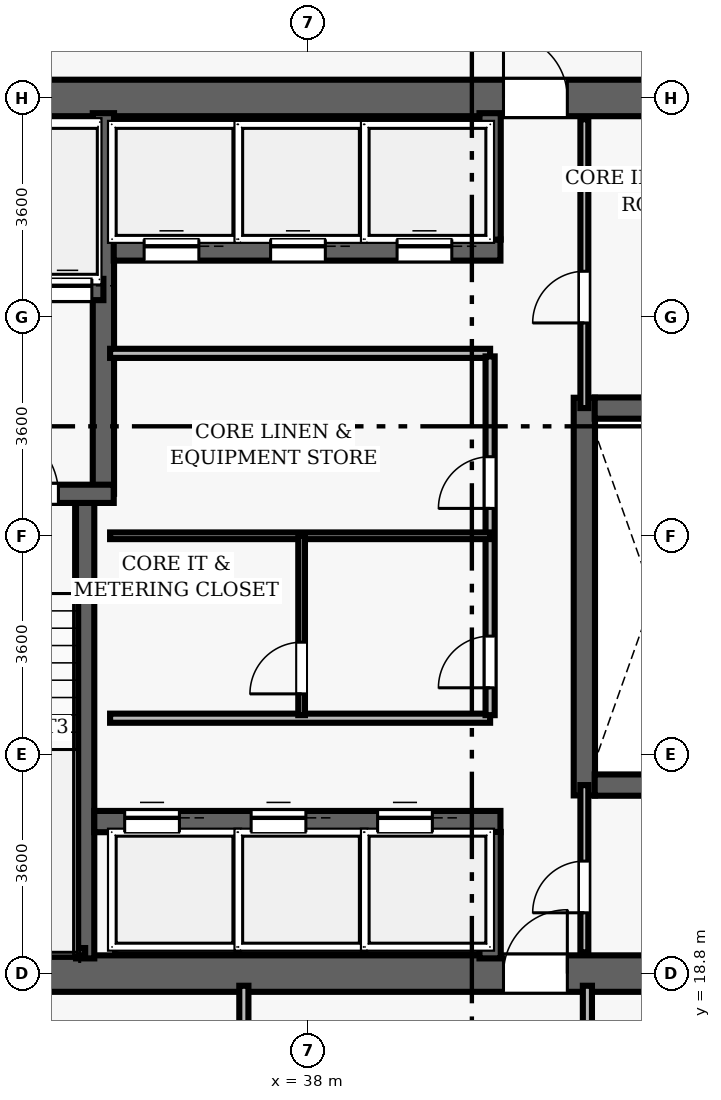
"""IFC4 building model, lengths in metres.
Left out: names, types, materials, properties, quantities, classifications, styles, units other than length and angle.
Written with IfcOpenShell. Run it as: python <this file> out.ifc"""

import sys

from ifc_helpers import new_model, si_unit, direction, frame, frame_2d, origin, place, context, subcontext, project, spatial, rectangle, extrude, element, fill, save


model = new_model("IFC4")
c1 = context("Model", 3, precision=1e-05, world=origin(), true_north=direction((0.0, 1.0)))
c2 = subcontext(c1, "Body", "Model", "MODEL_VIEW")
j1 = project(units=[si_unit("LENGTHUNIT", "METRE"), si_unit("PLANEANGLEUNIT", "RADIAN")], contexts=[c1])
p1 = place(None, origin())
s1 = spatial("IfcSite", under=j1, at=p1, CompositionType="ELEMENT")
p2 = place(p1, origin())
s2 = spatial("IfcBuilding", under=s1, at=p2, CompositionType="ELEMENT")
p3 = place(p2, frame((0.0, 0.0, 102.8)))
s3 = spatial("IfcBuildingStorey", under=s2, at=p3, CompositionType="ELEMENT", Elevation=102.8)
p4 = place(p3, frame((26.7, 18.8, 0.0), z_axis=(0.0, 0.0, 1.0), x_axis=(1.0, 0.0, 0.0)))
e1 = element("IfcWall", 1, at=p4, inside=s3, PredefinedType="SHEAR", context=c2, shape_type="SweptSolid", body=[
    extrude(rectangle(XDim=22.6, YDim=0.6, at=frame_2d((11.3, 0.0))), origin(), (0.0, 0.0, 1.0), 3.5),
])
p5 = place(p4, frame((14.52, 0.0, 0.0)))
e2 = element("IfcOpeningElement", 2, at=p5, cuts=e1, PredefinedType="OPENING", context=c2, shape_type="SweptSolid", body=[
    extrude(rectangle(XDim=1.05, YDim=2.15, at=frame_2d((0.525, 1.075))), frame((0.0, 0.31, 0.0), z_axis=(0.0, -1.0, 0.0), x_axis=(1.0, 0.0, 0.0)), (0.0, 0.0, 1.0), 0.62),
])
p6 = place(p3, frame((26.7, 33.2, 0.0), z_axis=(0.0, 0.0, 1.0), x_axis=(1.0, 0.0, 0.0)))
e3 = element("IfcWall", 3, at=p6, inside=s3, PredefinedType="SHEAR", context=c2, shape_type="SweptSolid", body=[
    extrude(rectangle(XDim=22.6, YDim=0.6, at=frame_2d((11.3, 0.0))), origin(), (0.0, 0.0, 1.0), 3.5),
])
p7 = place(p6, frame((4.62, 0.0, 0.0)))
e4 = element("IfcOpeningElement", 4, at=p7, cuts=e3, PredefinedType="OPENING", context=c2, shape_type="SweptSolid", body=[
    extrude(rectangle(XDim=1.05, YDim=2.15, at=frame_2d((0.525, 1.075))), frame((0.0, 0.31, 0.0), z_axis=(0.0, -1.0, 0.0), x_axis=(1.0, 0.0, 0.0)), (0.0, 0.0, 1.0), 0.62),
])
p8 = place(p6, frame((14.52, 0.0, 0.0)))
e5 = element("IfcOpeningElement", 5, at=p8, cuts=e3, PredefinedType="OPENING", context=c2, shape_type="SweptSolid", body=[
    extrude(rectangle(XDim=1.05, YDim=2.15, at=frame_2d((0.525, 1.075))), frame((0.0, 0.31, 0.0), z_axis=(0.0, -1.0, 0.0), x_axis=(1.0, 0.0, 0.0)), (0.0, 0.0, 1.0), 0.62),
])
p9 = place(p3, frame((34.34, 19.05, 0.0), z_axis=(0.0, 0.0, 1.0), x_axis=(0.0, 1.0, 0.0)))
e6 = element("IfcWall", 6, at=p9, inside=s3, PredefinedType="SHEAR", context=c2, shape_type="SweptSolid", body=[
    extrude(rectangle(XDim=7.5, YDim=0.3, at=frame_2d((3.75, 0.0))), origin(), (0.0, 0.0, 1.0), 3.5),
])
p10 = place(p3, frame((34.64, 26.69, 0.0), z_axis=(0.0, 0.0, 1.0), x_axis=(0.0, 1.0, 0.0)))
e7 = element("IfcWall", 7, at=p10, inside=s3, PredefinedType="SHEAR", context=c2, shape_type="SweptSolid", body=[
    extrude(rectangle(XDim=6.26, YDim=0.35, at=frame_2d((3.13, 0.0))), origin(), (0.0, 0.0, 1.0), 3.5),
])
p11 = place(p3, frame((31.25, 26.69, 0.0), z_axis=(0.0, 0.0, 1.0), x_axis=(1.0, 0.0, 0.0)))
e8 = element("IfcWall", 8, at=p11, inside=s3, PredefinedType="SHEAR", context=c2, shape_type="SweptSolid", body=[
    extrude(rectangle(XDim=3.56, YDim=0.3, at=frame_2d((1.78, 0.0))), origin(), (0.0, 0.0, 1.0), 3.5),
])
p12 = place(p11, frame((1.55, 0.0, 0.0)))
e9 = element("IfcOpeningElement", 9, at=p12, cuts=e8, PredefinedType="OPENING", context=c2, shape_type="SweptSolid", body=[
    extrude(rectangle(XDim=1.1, YDim=2.15, at=frame_2d((0.55, 1.075))), frame((0.0, 0.16, 0.0), z_axis=(0.0, -1.0, 0.0), x_axis=(1.0, 0.0, 0.0)), (0.0, 0.0, 1.0), 0.32),
])
p13 = place(p3, frame((31.3, 19.16, 0.0), z_axis=(0.0, 0.0, 1.0), x_axis=(1.0, 0.0, 0.0)))
e10 = element("IfcWall", 10, at=p13, inside=s3, PredefinedType="SHEAR", context=c2, shape_type="SweptSolid", body=[
    extrude(rectangle(XDim=3.04, YDim=0.12, at=frame_2d((1.52, 0.0))), origin(), (0.0, 0.0, 1.0), 3.5),
])
p14 = place(p3, frame((32.23, 30.05, 0.0), z_axis=(0.0, 0.0, 1.0), x_axis=(1.0, 0.0, 0.0)))
e11 = element("IfcWall", 11, at=p14, inside=s3, PredefinedType="SHEAR", context=c2, shape_type="SweptSolid", body=[
    extrude(rectangle(XDim=2.41, YDim=0.35, at=frame_2d((1.205, 0.0))), origin(), (0.0, 0.0, 1.0), 2.675),
])
p15 = place(p14, frame((0.42, 0.0, 0.0)))
e12 = element("IfcOpeningElement", 12, at=p15, cuts=e11, PredefinedType="OPENING", context=c2, shape_type="SweptSolid", body=[
    extrude(rectangle(XDim=0.8, YDim=2.15, at=frame_2d((0.4, 1.075))), frame((0.0, 0.185, 0.0), z_axis=(0.0, -1.0, 0.0), x_axis=(1.0, 0.0, 0.0)), (0.0, 0.0, 1.0), 0.37),
])
p16 = place(p14, frame((1.42, 0.0, 0.0)))
e13 = element("IfcOpeningElement", 13, at=p16, cuts=e11, PredefinedType="OPENING", context=c2, shape_type="SweptSolid", body=[
    extrude(rectangle(XDim=0.8, YDim=2.15, at=frame_2d((0.4, 1.075))), frame((0.0, 0.185, 0.0), z_axis=(0.0, -1.0, 0.0), x_axis=(1.0, 0.0, 0.0)), (0.0, 0.0, 1.0), 0.37),
])
p17 = place(p3, frame((42.55, 21.73, 0.0), z_axis=(0.0, 0.0, 1.0), x_axis=(0.0, 1.0, 0.0)))
e14 = element("IfcWall", 14, at=p17, inside=s3, PredefinedType="SHEAR", context=c2, shape_type="SweptSolid", body=[
    extrude(rectangle(XDim=6.54, YDim=0.35, at=frame_2d((3.27, 0.0))), origin(), (0.0, 0.0, 1.0), 2.675),
])
for number, where, z_axis, x_axis in (
    (15, (42.72, 21.9, 0.0), (0.0, 0.0, 1.0), (1.0, 0.0, 0.0)),
    (16, (42.72, 28.1, 0.0), (0.0, 0.0, 1.0), (1.0, 0.0, 0.0)),
):
    element("IfcWall", number, at=place(p3, frame(where, z_axis=z_axis, x_axis=x_axis)), inside=s3, PredefinedType="SHEAR", context=c2, shape_type="SweptSolid", body=[
        extrude(rectangle(XDim=2.03, YDim=0.35, at=frame_2d((1.015, 0.0))), origin(), (0.0, 0.0, 1.0), 2.675),
    ])
p18 = place(p3, frame((34.81, 30.7, 0.0), z_axis=(0.0, 0.0, 1.0), x_axis=(1.0, 0.0, 0.0)))
e17 = element("IfcWall", 17, at=p18, inside=s3, PredefinedType="SHEAR", context=c2, shape_type="SweptSolid", body=[
    extrude(rectangle(XDim=6.36, YDim=0.35, at=frame_2d((3.18, 0.0))), origin(), (0.0, 0.0, 1.0), 2.675),
])
p19 = place(p18, frame((0.5, 0.0, 0.0)))
e18 = element("IfcOpeningElement", 18, at=p19, cuts=e17, PredefinedType="OPENING", context=c2, shape_type="SweptSolid", body=[
    extrude(rectangle(XDim=0.9, YDim=2.15, at=frame_2d((0.45, 1.075))), frame((0.0, 0.185, 0.0), z_axis=(0.0, -1.0, 0.0), x_axis=(1.0, 0.0, 0.0)), (0.0, 0.0, 1.0), 0.37),
])
p20 = place(p18, frame((2.58, 0.0, 0.0)))
e19 = element("IfcOpeningElement", 19, at=p20, cuts=e17, PredefinedType="OPENING", context=c2, shape_type="SweptSolid", body=[
    extrude(rectangle(XDim=0.9, YDim=2.15, at=frame_2d((0.45, 1.075))), frame((0.0, 0.185, 0.0), z_axis=(0.0, -1.0, 0.0), x_axis=(1.0, 0.0, 0.0)), (0.0, 0.0, 1.0), 0.37),
])
p21 = place(p18, frame((4.66, 0.0, 0.0)))
e20 = element("IfcOpeningElement", 20, at=p21, cuts=e17, PredefinedType="OPENING", context=c2, shape_type="SweptSolid", body=[
    extrude(rectangle(XDim=0.9, YDim=2.15, at=frame_2d((0.45, 1.075))), frame((0.0, 0.185, 0.0), z_axis=(0.0, -1.0, 0.0), x_axis=(1.0, 0.0, 0.0)), (0.0, 0.0, 1.0), 0.37),
])
p22 = place(p3, frame((41.0, 30.87, 0.0), z_axis=(0.0, 0.0, 1.0), x_axis=(0.0, 1.0, 0.0)))
e21 = element("IfcWall", 21, at=p22, inside=s3, PredefinedType="SHEAR", context=c2, shape_type="SweptSolid", body=[
    extrude(rectangle(XDim=2.08, YDim=0.35, at=frame_2d((1.04, 0.0))), origin(), (0.0, 0.0, 1.0), 2.675),
])
p23 = place(p3, frame((34.49, 21.3, 0.0), z_axis=(0.0, 0.0, 1.0), x_axis=(1.0, 0.0, 0.0)))
e22 = element("IfcWall", 22, at=p23, inside=s3, PredefinedType="SHEAR", context=c2, shape_type="SweptSolid", body=[
    extrude(rectangle(XDim=6.68, YDim=0.35, at=frame_2d((3.34, 0.0))), origin(), (0.0, 0.0, 1.0), 2.675),
])
p24 = place(p23, frame((0.5, 0.0, 0.0)))
e23 = element("IfcOpeningElement", 23, at=p24, cuts=e22, PredefinedType="OPENING", context=c2, shape_type="SweptSolid", body=[
    extrude(rectangle(XDim=0.9, YDim=2.15, at=frame_2d((0.45, 1.075))), frame((0.0, 0.185, 0.0), z_axis=(0.0, -1.0, 0.0), x_axis=(1.0, 0.0, 0.0)), (0.0, 0.0, 1.0), 0.37),
])
p25 = place(p23, frame((2.58, 0.0, 0.0)))
e24 = element("IfcOpeningElement", 24, at=p25, cuts=e22, PredefinedType="OPENING", context=c2, shape_type="SweptSolid", body=[
    extrude(rectangle(XDim=0.9, YDim=2.15, at=frame_2d((0.45, 1.075))), frame((0.0, 0.185, 0.0), z_axis=(0.0, -1.0, 0.0), x_axis=(1.0, 0.0, 0.0)), (0.0, 0.0, 1.0), 0.37),
])
p26 = place(p23, frame((4.66, 0.0, 0.0)))
e25 = element("IfcOpeningElement", 25, at=p26, cuts=e22, PredefinedType="OPENING", context=c2, shape_type="SweptSolid", body=[
    extrude(rectangle(XDim=0.9, YDim=2.15, at=frame_2d((0.45, 1.075))), frame((0.0, 0.185, 0.0), z_axis=(0.0, -1.0, 0.0), x_axis=(1.0, 0.0, 0.0)), (0.0, 0.0, 1.0), 0.37),
])
p27 = place(p3, frame((41.0, 19.05, 0.0), z_axis=(0.0, 0.0, 1.0), x_axis=(0.0, 1.0, 0.0)))
e26 = element("IfcWall", 26, at=p27, inside=s3, PredefinedType="SHEAR", context=c2, shape_type="SweptSolid", body=[
    extrude(rectangle(XDim=2.08, YDim=0.35, at=frame_2d((1.04, 0.0))), origin(), (0.0, 0.0, 1.0), 2.675),
])
for number, where, z_axis, x_axis in (
    (27, (34.75, 29.0, 0.0), (0.0, 0.0, 1.0), (1.0, 0.0, 0.0)),
    (28, (34.75, 23.0, 0.0), (0.0, 0.0, 1.0), (1.0, 0.0, 0.0)),
):
    element("IfcWall", number, at=place(p3, frame(where, z_axis=z_axis, x_axis=x_axis)), inside=s3, PredefinedType="PARTITIONING", context=c2, shape_type="SweptSolid", body=[
        extrude(rectangle(XDim=6.25, YDim=0.15, at=frame_2d((3.125, 0.0))), origin(), (0.0, 0.0, 1.0), 2.675),
    ])
p28 = place(p3, frame((41.0, 23.05, 0.0), z_axis=(0.0, 0.0, 1.0), x_axis=(0.0, 1.0, 0.0)))
e29 = element("IfcWall", 29, at=p28, inside=s3, PredefinedType="PARTITIONING", context=c2, shape_type="SweptSolid", body=[
    extrude(rectangle(XDim=5.9, YDim=0.15, at=frame_2d((2.95, 0.0))), origin(), (0.0, 0.0, 1.0), 2.675),
])
p29 = place(p28, frame((3.4, 0.0, 0.0)))
e30 = element("IfcOpeningElement", 30, at=p29, cuts=e29, PredefinedType="OPENING", context=c2, shape_type="SweptSolid", body=[
    extrude(rectangle(XDim=0.85, YDim=2.1, at=frame_2d((0.425, 1.05))), frame((0.0, 0.085, 0.0), z_axis=(0.0, -1.0, 0.0), x_axis=(1.0, 0.0, 0.0)), (0.0, 0.0, 1.0), 0.17),
])
p30 = place(p28, frame((0.45, 0.0, 0.0)))
e31 = element("IfcOpeningElement", 31, at=p30, cuts=e29, PredefinedType="OPENING", context=c2, shape_type="SweptSolid", body=[
    extrude(rectangle(XDim=0.85, YDim=2.1, at=frame_2d((0.425, 1.05))), frame((0.0, 0.085, 0.0), z_axis=(0.0, -1.0, 0.0), x_axis=(1.0, 0.0, 0.0)), (0.0, 0.0, 1.0), 0.17),
])
p31 = place(p3, frame((34.75, 26.0, 0.0), z_axis=(0.0, 0.0, 1.0), x_axis=(1.0, 0.0, 0.0)))
e32 = element("IfcWall", 32, at=p31, inside=s3, PredefinedType="PARTITIONING", context=c2, shape_type="SweptSolid", body=[
    extrude(rectangle(XDim=6.25, YDim=0.11, at=frame_2d((3.125, 0.0))), origin(), (0.0, 0.0, 1.0), 2.675),
])
p32 = place(p3, frame((37.9, 23.05, 0.0), z_axis=(0.0, 0.0, 1.0), x_axis=(0.0, 1.0, 0.0)))
e33 = element("IfcWall", 33, at=p32, inside=s3, PredefinedType="PARTITIONING", context=c2, shape_type="SweptSolid", body=[
    extrude(rectangle(XDim=2.95, YDim=0.11, at=frame_2d((1.475, 0.0))), origin(), (0.0, 0.0, 1.0), 2.675),
])
p33 = place(p32, frame((0.35, 0.0, 0.0)))
e34 = element("IfcOpeningElement", 34, at=p33, cuts=e33, PredefinedType="OPENING", context=c2, shape_type="SweptSolid", body=[
    extrude(rectangle(XDim=0.85, YDim=2.1, at=frame_2d((0.425, 1.05))), frame((0.0, 0.065, 0.0), z_axis=(0.0, -1.0, 0.0), x_axis=(1.0, 0.0, 0.0)), (0.0, 0.0, 1.0), 0.13),
])
p34 = place(p3, frame((42.55, 28.1, 0.0), z_axis=(0.0, 0.0, 1.0), x_axis=(0.0, 1.0, 0.0)))
e35 = element("IfcWall", 35, at=p34, inside=s3, PredefinedType="PARTITIONING", context=c2, shape_type="SweptSolid", body=[
    extrude(rectangle(XDim=4.75, YDim=0.13, at=frame_2d((2.375, 0.0))), origin(), (0.0, 0.0, 1.0), 2.675),
])
p35 = place(p34, frame((1.4, 0.0, 0.0)))
e36 = element("IfcOpeningElement", 36, at=p35, cuts=e35, PredefinedType="OPENING", context=c2, shape_type="SweptSolid", body=[
    extrude(rectangle(XDim=0.85, YDim=2.1, at=frame_2d((0.425, 1.05))), frame((0.0, 0.075, 0.0), z_axis=(0.0, -1.0, 0.0), x_axis=(1.0, 0.0, 0.0)), (0.0, 0.0, 1.0), 0.15),
])
p36 = place(p3, frame((42.55, 19.15, 0.0), z_axis=(0.0, 0.0, 1.0), x_axis=(0.0, 1.0, 0.0)))
e37 = element("IfcWall", 37, at=p36, inside=s3, PredefinedType="PARTITIONING", context=c2, shape_type="SweptSolid", body=[
    extrude(rectangle(XDim=2.75, YDim=0.13, at=frame_2d((1.375, 0.0))), origin(), (0.0, 0.0, 1.0), 2.675),
])
p37 = place(p36, frame((0.65, 0.0, 0.0)))
e38 = element("IfcOpeningElement", 38, at=p37, cuts=e37, PredefinedType="OPENING", context=c2, shape_type="SweptSolid", body=[
    extrude(rectangle(XDim=0.85, YDim=2.1, at=frame_2d((0.425, 1.05))), frame((0.0, 0.075, 0.0), z_axis=(0.0, -1.0, 0.0), x_axis=(1.0, 0.0, 0.0)), (0.0, 0.0, 1.0), 0.15),
])
p38 = place(p3, frame((36.95, 11.2, 0.0), z_axis=(0.0, 0.0, 1.0), x_axis=(0.0, 1.0, 0.0)))
e39 = element("IfcWall", 39, at=p38, inside=s3, PredefinedType="PARTITIONING", context=c2, shape_type="SweptSolid", body=[
    extrude(rectangle(XDim=7.4, YDim=0.15, at=frame_2d((3.7, 0.0))), origin(), (0.0, 0.0, 1.0), 2.675),
])
p39 = place(p38, frame((5.075, 0.0, 0.0)))
e40 = element("IfcOpeningElement", 40, at=p39, cuts=e39, PredefinedType="OPENING", context=c2, shape_type="SweptSolid", body=[
    extrude(rectangle(XDim=0.95, YDim=2.15, at=frame_2d((0.475, 1.075))), frame((0.0, 0.085, 0.0), z_axis=(0.0, -1.0, 0.0), x_axis=(1.0, 0.0, 0.0)), (0.0, 0.0, 1.0), 0.17),
])
p40 = place(p3, frame((42.6, 16.65, 0.0), z_axis=(0.0, 0.0, 1.0), x_axis=(0.0, 1.0, 0.0)))
e41 = element("IfcWall", 41, at=p40, inside=s3, PredefinedType="PARTITIONING", context=c2, shape_type="SweptSolid", body=[
    extrude(rectangle(XDim=1.95, YDim=0.15, at=frame_2d((0.975, 0.0))), origin(), (0.0, 0.0, 1.0), 2.675),
])
p41 = place(p12, origin())
e42 = element("IfcDoor", 42, at=p41, inside=s3, OperationType="SINGLE_SWING_LEFT", PredefinedType="DOOR", context=c2, shape_type="SweptSolid", body=[
    extrude(rectangle(XDim=1.1, YDim=2.15, at=frame_2d((0.55, 1.075))), frame((0.0, 0.025, 0.0), z_axis=(0.0, -1.0, 0.0), x_axis=(1.0, 0.0, 0.0)), (0.0, 0.0, 1.0), 0.05),
])
fill(e9, e42)
p42 = place(p8, origin())
e43 = element("IfcDoor", 43, at=p42, inside=s3, OperationType="SINGLE_SWING_LEFT", PredefinedType="DOOR", context=c2, shape_type="SweptSolid", body=[
    extrude(rectangle(XDim=1.05, YDim=2.15, at=frame_2d((0.525, 1.075))), frame((0.0, 0.025, 0.0), z_axis=(0.0, -1.0, 0.0), x_axis=(1.0, 0.0, 0.0)), (0.0, 0.0, 1.0), 0.05),
])
fill(e5, e43)
p43 = place(p5, origin())
e44 = element("IfcDoor", 44, at=p43, inside=s3, OperationType="SINGLE_SWING_RIGHT", PredefinedType="DOOR", context=c2, shape_type="SweptSolid", body=[
    extrude(rectangle(XDim=1.05, YDim=2.15, at=frame_2d((0.525, 1.075))), frame((0.0, 0.025, 0.0), z_axis=(0.0, -1.0, 0.0), x_axis=(1.0, 0.0, 0.0)), (0.0, 0.0, 1.0), 0.05),
])
fill(e2, e44)
p44 = place(p29, origin())
e45 = element("IfcDoor", 45, at=p44, inside=s3, OperationType="SINGLE_SWING_LEFT", PredefinedType="DOOR", context=c2, shape_type="SweptSolid", body=[
    extrude(rectangle(XDim=0.85, YDim=2.1, at=frame_2d((0.425, 1.05))), frame((0.0, 0.025, 0.0), z_axis=(0.0, -1.0, 0.0), x_axis=(1.0, 0.0, 0.0)), (0.0, 0.0, 1.0), 0.05),
])
fill(e30, e45)
p45 = place(p30, origin())
e46 = element("IfcDoor", 46, at=p45, inside=s3, OperationType="SINGLE_SWING_LEFT", PredefinedType="DOOR", context=c2, shape_type="SweptSolid", body=[
    extrude(rectangle(XDim=0.85, YDim=2.1, at=frame_2d((0.425, 1.05))), frame((0.0, 0.025, 0.0), z_axis=(0.0, -1.0, 0.0), x_axis=(1.0, 0.0, 0.0)), (0.0, 0.0, 1.0), 0.05),
])
fill(e31, e46)
p46 = place(p33, origin())
e47 = element("IfcDoor", 47, at=p46, inside=s3, OperationType="SINGLE_SWING_LEFT", PredefinedType="DOOR", context=c2, shape_type="SweptSolid", body=[
    extrude(rectangle(XDim=0.85, YDim=2.1, at=frame_2d((0.425, 1.05))), frame((0.0, 0.025, 0.0), z_axis=(0.0, -1.0, 0.0), x_axis=(1.0, 0.0, 0.0)), (0.0, 0.0, 1.0), 0.05),
])
fill(e34, e47)
p47 = place(p35, origin())
e48 = element("IfcDoor", 48, at=p47, inside=s3, OperationType="SINGLE_SWING_LEFT", PredefinedType="DOOR", context=c2, shape_type="SweptSolid", body=[
    extrude(rectangle(XDim=0.85, YDim=2.1, at=frame_2d((0.425, 1.05))), frame((0.0, 0.025, 0.0), z_axis=(0.0, -1.0, 0.0), x_axis=(1.0, 0.0, 0.0)), (0.0, 0.0, 1.0), 0.05),
])
fill(e36, e48)
p48 = place(p37, origin())
e49 = element("IfcDoor", 49, at=p48, inside=s3, OperationType="SINGLE_SWING_LEFT", PredefinedType="DOOR", context=c2, shape_type="SweptSolid", body=[
    extrude(rectangle(XDim=0.85, YDim=2.1, at=frame_2d((0.425, 1.05))), frame((0.0, 0.025, 0.0), z_axis=(0.0, -1.0, 0.0), x_axis=(1.0, 0.0, 0.0)), (0.0, 0.0, 1.0), 0.05),
])
fill(e38, e49)
p49 = place(p19, origin())
e50 = element("IfcDoor", 50, at=p49, inside=s3, OperationType="SLIDING_TO_LEFT", PredefinedType="DOOR", context=c2, shape_type="SweptSolid", body=[
    extrude(rectangle(XDim=0.9, YDim=2.15, at=frame_2d((0.45, 1.075))), frame((0.0, 0.025, 0.0), z_axis=(0.0, -1.0, 0.0), x_axis=(1.0, 0.0, 0.0)), (0.0, 0.0, 1.0), 0.05),
])
fill(e18, e50)
p50 = place(p20, origin())
e51 = element("IfcDoor", 51, at=p50, inside=s3, OperationType="SLIDING_TO_LEFT", PredefinedType="DOOR", context=c2, shape_type="SweptSolid", body=[
    extrude(rectangle(XDim=0.9, YDim=2.15, at=frame_2d((0.45, 1.075))), frame((0.0, 0.025, 0.0), z_axis=(0.0, -1.0, 0.0), x_axis=(1.0, 0.0, 0.0)), (0.0, 0.0, 1.0), 0.05),
])
fill(e19, e51)
p51 = place(p21, origin())
e52 = element("IfcDoor", 52, at=p51, inside=s3, OperationType="SLIDING_TO_LEFT", PredefinedType="DOOR", context=c2, shape_type="SweptSolid", body=[
    extrude(rectangle(XDim=0.9, YDim=2.15, at=frame_2d((0.45, 1.075))), frame((0.0, 0.025, 0.0), z_axis=(0.0, -1.0, 0.0), x_axis=(1.0, 0.0, 0.0)), (0.0, 0.0, 1.0), 0.05),
])
fill(e20, e52)
p52 = place(p24, origin())
e53 = element("IfcDoor", 53, at=p52, inside=s3, OperationType="SLIDING_TO_LEFT", PredefinedType="DOOR", context=c2, shape_type="SweptSolid", body=[
    extrude(rectangle(XDim=0.9, YDim=2.15, at=frame_2d((0.45, 1.075))), frame((0.0, 0.025, 0.0), z_axis=(0.0, -1.0, 0.0), x_axis=(1.0, 0.0, 0.0)), (0.0, 0.0, 1.0), 0.05),
])
fill(e23, e53)
p53 = place(p25, origin())
e54 = element("IfcDoor", 54, at=p53, inside=s3, OperationType="SLIDING_TO_LEFT", PredefinedType="DOOR", context=c2, shape_type="SweptSolid", body=[
    extrude(rectangle(XDim=0.9, YDim=2.15, at=frame_2d((0.45, 1.075))), frame((0.0, 0.025, 0.0), z_axis=(0.0, -1.0, 0.0), x_axis=(1.0, 0.0, 0.0)), (0.0, 0.0, 1.0), 0.05),
])
fill(e24, e54)
p54 = place(p26, origin())
e55 = element("IfcDoor", 55, at=p54, inside=s3, OperationType="SLIDING_TO_LEFT", PredefinedType="DOOR", context=c2, shape_type="SweptSolid", body=[
    extrude(rectangle(XDim=0.9, YDim=2.15, at=frame_2d((0.45, 1.075))), frame((0.0, 0.025, 0.0), z_axis=(0.0, -1.0, 0.0), x_axis=(1.0, 0.0, 0.0)), (0.0, 0.0, 1.0), 0.05),
])
fill(e25, e55)
p55 = place(p16, origin())
e56 = element("IfcDoor", 56, at=p55, inside=s3, OperationType="SLIDING_TO_LEFT", PredefinedType="DOOR", context=c2, shape_type="SweptSolid", body=[
    extrude(rectangle(XDim=0.8, YDim=2.15, at=frame_2d((0.4, 1.075))), frame((0.0, 0.025, 0.0), z_axis=(0.0, -1.0, 0.0), x_axis=(1.0, 0.0, 0.0)), (0.0, 0.0, 1.0), 0.05),
])
fill(e13, e56)
save(model, sys.argv[1])
